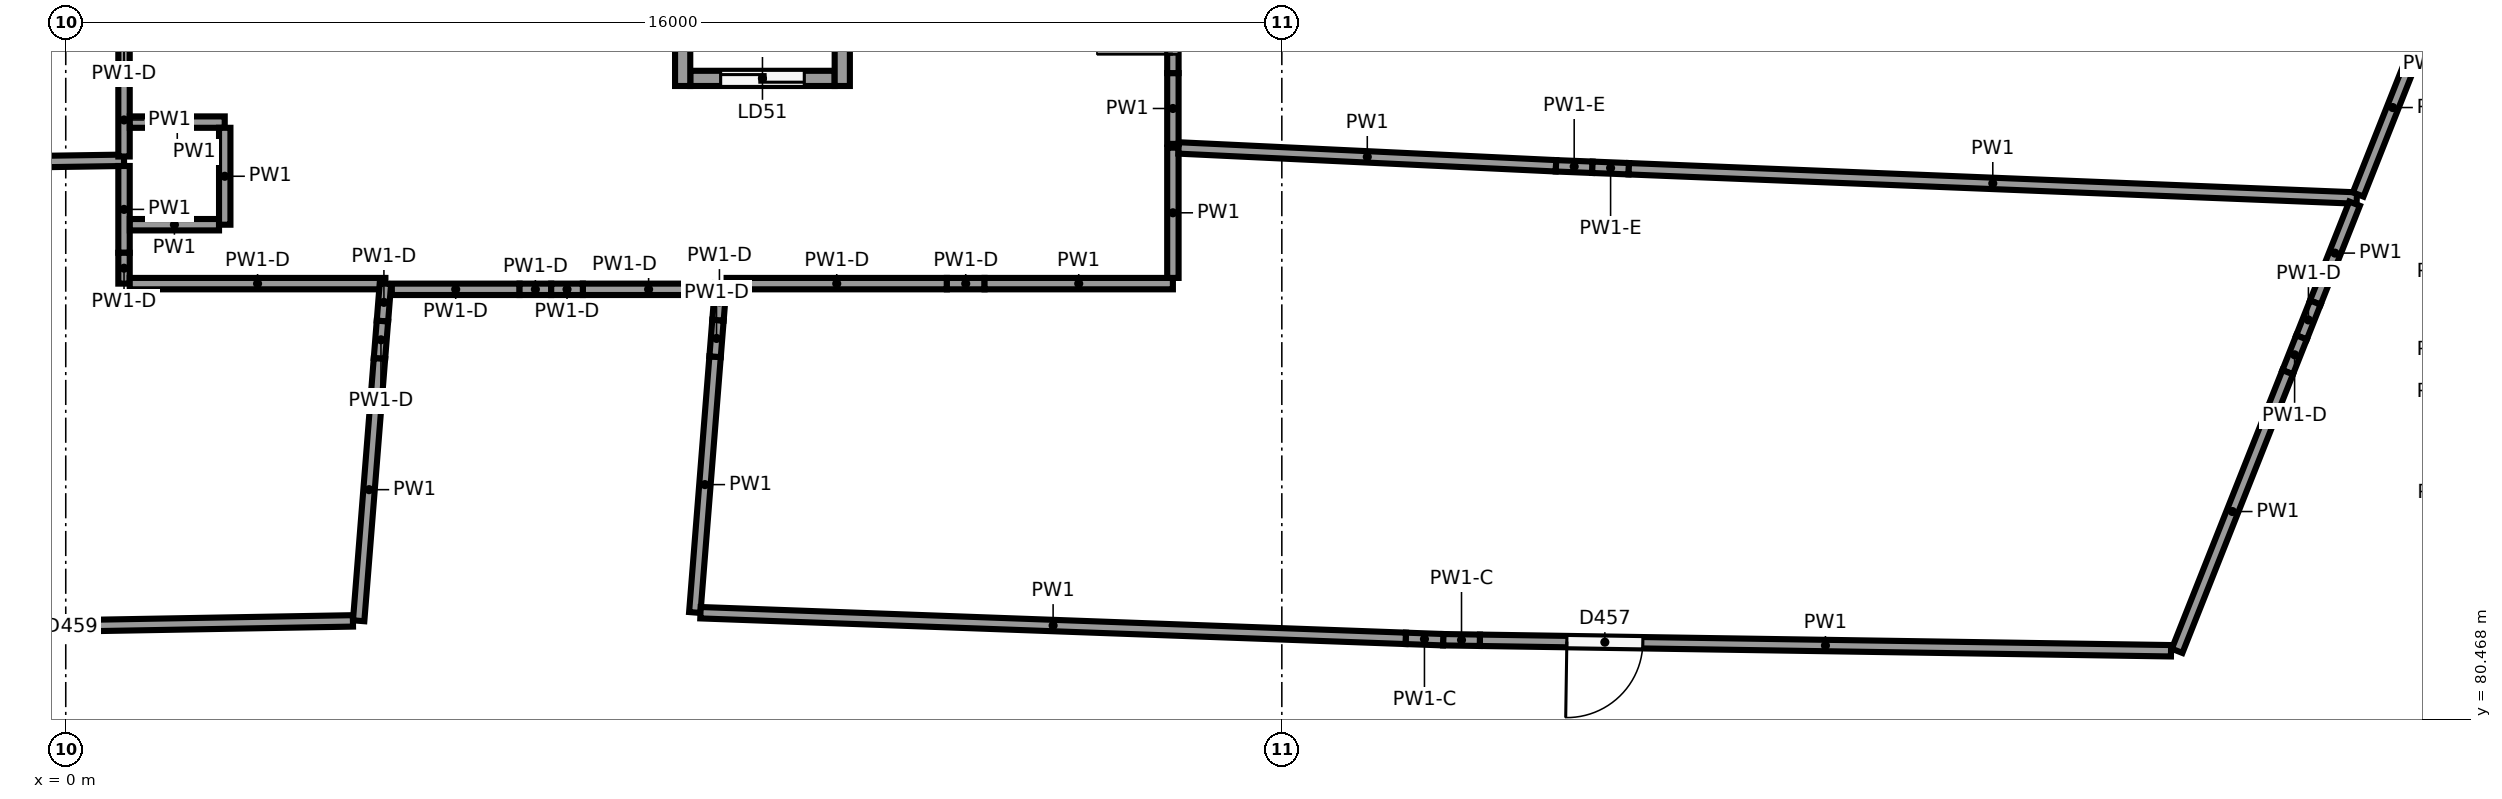
"""IFC4 building model, lengths in metres.
Left out: names, types, materials, properties, quantities, classifications, styles, units other than length and angle.
Written with IfcOpenShell. Run it as: python <this file> out.ifc"""

import sys

from ifc_helpers import new_model, si_unit, direction, frame, frame_2d, origin, origin_2d, place, context, subcontext, project, spatial, rectangle, circle, extrude, element, fill, save


model = new_model("IFC4")
c1 = context("Model", 3, precision=1e-05, world=origin(), true_north=direction((0.0, 1.0)))
c2 = subcontext(c1, "Body", "Model", "MODEL_VIEW")
j1 = project(units=[si_unit("LENGTHUNIT", "METRE"), si_unit("PLANEANGLEUNIT", "RADIAN")], contexts=[c1])
p1 = place(None, origin())
s1 = spatial("IfcSite", under=j1, at=p1, CompositionType="ELEMENT")
p2 = place(p1, origin())
s2 = spatial("IfcBuilding", under=s1, at=p2, CompositionType="ELEMENT")
p3 = place(p2, frame((0.0, 0.0, -4.0)))
s3 = spatial("IfcBuildingStorey", under=s2, at=p3, CompositionType="ELEMENT", Elevation=-4.0)
p4 = place(p3, frame((19.119, 85.698, -0.4), z_axis=(0.0, 0.0, 1.0), x_axis=(1.0, 0.0, 0.0)))
e1 = element("IfcColumn", 1, at=p4, inside=s3, PredefinedType="COLUMN", context=c2, shape_type="SweptSolid", body=[
    extrude(circle(Radius=0.4, at=origin_2d()), origin(), (0.0, 0.0, 1.0), 4.4),
])
p5 = place(p3, frame((20.65, 89.656, -0.4), z_axis=(0.0, 0.0, 1.0), x_axis=(1.0, 0.0, 0.0)))
e2 = element("IfcColumn", 2, at=p5, inside=s3, PredefinedType="COLUMN", context=c2, shape_type="SweptSolid", body=[
    extrude(circle(Radius=0.45, at=origin_2d()), origin(), (0.0, 0.0, 1.0), 4.4),
])
p6 = place(p3, frame((6.387, 85.877, -1.2), z_axis=(0.0, 0.0, 1.0), x_axis=(1.0, 0.0, 0.0)))
e3 = element("IfcColumn", 3, at=p6, inside=s3, PredefinedType="COLUMN", context=c2, shape_type="SweptSolid", body=[
    extrude(circle(Radius=0.4, at=origin_2d()), origin(), (0.0, 0.0, 1.0), 5.2),
])
p7 = place(p3, frame((6.517, 89.546, -1.2), z_axis=(0.0, 0.0, 1.0), x_axis=(1.0, 0.0, 0.0)))
e4 = element("IfcColumn", 4, at=p7, inside=s3, PredefinedType="COLUMN", context=c2, shape_type="SweptSolid", body=[
    extrude(circle(Radius=0.55, at=origin_2d()), origin(), (0.0, 0.0, 1.0), 5.2),
])
for number, where, z_axis, x_axis in (
    (5, (10.217, 91.8, -1.2), (0.0, 0.0, 1.0), (0.0, -1.0, 0.0)),
    (6, (8.117, 91.8, -1.2), (0.0, 0.0, 1.0), (0.0, -1.0, 0.0)),
):
    element("IfcWall", number, at=place(p3, frame(where, z_axis=z_axis, x_axis=x_axis)), inside=s3, PredefinedType="SHEAR", context=c2, shape_type="SweptSolid", body=[
        extrude(rectangle(XDim=3.0, YDim=0.2, at=frame_2d((1.5, 0.0))), origin(), (0.0, 0.0, 1.0), 4.8),
    ])
p8 = place(p3, frame((10.117, 88.9, -1.2), z_axis=(0.0, 0.0, 1.0), x_axis=(-1.0, 0.0, 0.0)))
e7 = element("IfcWall", 7, at=p8, inside=s3, PredefinedType="SHEAR", context=c2, shape_type="SweptSolid", body=[
    extrude(rectangle(XDim=1.9, YDim=0.2, at=frame_2d((0.95, 0.0))), origin(), (0.0, 0.0, 1.0), 4.8),
])
p9 = place(p8, frame((0.4, 0.0, 1.2)))
e8 = element("IfcOpeningElement", 8, at=p9, cuts=e7, PredefinedType="OPENING", context=c2, shape_type="SweptSolid", body=[
    extrude(rectangle(XDim=1.1, YDim=2.1, at=frame_2d((0.55, 1.05))), frame((0.0, 0.11, 0.0), z_axis=(0.0, -1.0, 0.0), x_axis=(1.0, 0.0, 0.0)), (0.0, 0.0, 1.0), 0.22),
])
p10 = place(p3, frame((8.276, 81.873, 0.0), z_axis=(0.0, 0.0, 1.0), x_axis=(0.079118582515, 0.996865211501, 0.0)))
e9 = element("IfcWall", 9, at=p10, inside=s3, PredefinedType="PARTITIONING", context=c2, shape_type="SweptSolid", body=[
    extrude(rectangle(XDim=3.376, YDim=0.15, at=frame_2d((1.688, 0.0))), origin(), (0.0, 0.0, 1.0), 3.6),
])
for number, where, z_axis, x_axis in (
    (10, (8.543, 85.239, 0.0), (0.0, 0.0, 1.0), (0.079, 0.997, 0.0)),
    (11, (8.582, 85.719, 0.0), (0.0, 0.0, 1.0), (0.079, 0.997, 0.0)),
):
    element("IfcWall", number, at=place(p3, frame(where, z_axis=z_axis, x_axis=x_axis)), inside=s3, PredefinedType="PARTITIONING", context=c2, shape_type="SweptSolid", body=[
        extrude(rectangle(XDim=0.482, YDim=0.15, at=frame_2d((0.241, 0.0))), origin(), (0.0, 0.0, 1.0), 2.3),
    ])
p11 = place(p3, frame((8.695, 86.2, 0.0), z_axis=(0.0, 0.0, 1.0), x_axis=(1.0, 0.0, 0.0)))
e12 = element("IfcWall", 12, at=p11, inside=s3, PredefinedType="PARTITIONING", context=c2, shape_type="SweptSolid", body=[
    extrude(rectangle(XDim=2.898, YDim=0.15, at=frame_2d((1.449, 0.0))), origin(), (0.0, 0.0, 1.0), 2.3),
])
p12 = place(p3, frame((11.593, 86.2, 0.0), z_axis=(0.0, 0.0, 1.0), x_axis=(1.0, 0.0, 0.0)))
e13 = element("IfcWall", 13, at=p12, inside=s3, PredefinedType="PARTITIONING", context=c2, shape_type="SweptSolid", body=[
    extrude(rectangle(XDim=0.496, YDim=0.15, at=frame_2d((0.248, 0.0))), origin(), (0.0, 0.0, 1.0), 2.3),
])
p13 = place(p3, frame((12.089, 86.2, 0.0), z_axis=(0.0, 0.0, 1.0), x_axis=(1.0, 0.0, 0.0)))
e14 = element("IfcWall", 14, at=p13, inside=s3, PredefinedType="PARTITIONING", context=c2, shape_type="SweptSolid", body=[
    extrude(rectangle(XDim=2.478, YDim=0.15, at=frame_2d((1.239, 0.0))), origin(), (0.0, 0.0, 1.0), 3.6),
])
p14 = place(p3, frame((14.567, 86.275, 0.0), z_axis=(0.0, 0.0, 1.0), x_axis=(0.0, 1.0, 0.0)))
e15 = element("IfcWall", 15, at=p14, inside=s3, PredefinedType="PARTITIONING", context=c2, shape_type="SweptSolid", body=[
    extrude(rectangle(XDim=1.714, YDim=0.15, at=frame_2d((0.857, 0.0))), origin(), (0.0, 0.0, 1.0), 3.6),
])
p15 = place(p3, frame((14.642, 87.985, 0.0), z_axis=(0.0, 0.0, 1.0), x_axis=(0.998880990071, -0.047294478265, 0.0)))
e16 = element("IfcWall", 16, at=p15, inside=s3, PredefinedType="PARTITIONING", context=c2, shape_type="SweptSolid", body=[
    extrude(rectangle(XDim=4.971, YDim=0.15, at=frame_2d((2.486, 0.0))), origin(), (0.0, 0.0, 1.0), 3.6),
])
p16 = place(p3, frame((19.607, 87.75, 0.0), z_axis=(0.0, 0.0, 1.0), x_axis=(0.999190347819, -0.040232435004, 0.0)))
e17 = element("IfcWall", 17, at=p16, inside=s3, PredefinedType="PARTITIONING", context=c2, shape_type="SweptSolid", body=[
    extrude(rectangle(XDim=0.479, YDim=0.15, at=frame_2d((0.24, 0.0))), origin(), (0.0, 0.0, 1.0), 2.85),
])
p17 = place(p3, frame((20.086, 87.731, 0.0), z_axis=(0.0, 0.0, 1.0), x_axis=(0.999189522857, -0.040252918055, 0.0)))
e18 = element("IfcWall", 18, at=p17, inside=s3, PredefinedType="PARTITIONING", context=c2, shape_type="SweptSolid", body=[
    extrude(rectangle(XDim=0.479, YDim=0.15, at=frame_2d((0.24, 0.0))), origin(), (0.0, 0.0, 1.0), 2.85),
])
p18 = place(p3, frame((20.565, 87.711, 0.0), z_axis=(0.0, 0.0, 1.0), x_axis=(0.999191082899, -0.040214174799, 0.0)))
e19 = element("IfcWall", 19, at=p18, inside=s3, PredefinedType="PARTITIONING", context=c2, shape_type="SweptSolid", body=[
    extrude(rectangle(XDim=9.586, YDim=0.15, at=frame_2d((4.793, 0.0))), origin(), (0.0, 0.0, 1.0), 3.6),
])
p19 = place(p3, frame((30.114, 87.252, 0.0), z_axis=(0.0, 0.0, 1.0), x_axis=(-0.368802456255, -0.929507798924, 0.0)))
e20 = element("IfcWall", 20, at=p19, inside=s3, PredefinedType="PARTITIONING", context=c2, shape_type="SweptSolid", body=[
    extrude(rectangle(XDim=1.399, YDim=0.15, at=frame_2d((0.7, 0.0))), origin(), (0.0, 0.0, 1.0), 3.6),
])
for number, where, z_axis, x_axis in (
    (21, (29.598, 85.951, 0.0), (0.0, 0.0, 1.0), (-0.369, -0.929, 0.0)),
    (22, (29.416, 85.493, 0.0), (0.0, 0.0, 1.0), (-0.369, -0.929, 0.0)),
):
    element("IfcWall", number, at=place(p3, frame(where, z_axis=z_axis, x_axis=x_axis)), inside=s3, PredefinedType="PARTITIONING", context=c2, shape_type="SweptSolid", body=[
        extrude(rectangle(XDim=0.493, YDim=0.15, at=frame_2d((0.247, 0.0))), origin(), (0.0, 0.0, 1.0), 2.3),
    ])
p20 = place(p3, frame((29.234, 85.035, 0.0), z_axis=(0.0, 0.0, 1.0), x_axis=(-0.368859950934, -0.9294849846, 0.0)))
e23 = element("IfcWall", 23, at=p20, inside=s3, PredefinedType="PARTITIONING", context=c2, shape_type="SweptSolid", body=[
    extrude(rectangle(XDim=3.944, YDim=0.15, at=frame_2d((1.972, 0.0))), origin(), (0.0, 0.0, 1.0), 3.6),
])
p21 = place(p3, frame((27.699, 81.37, 0.0), z_axis=(0.0, 0.0, 1.0), x_axis=(-0.999884976641, 0.015166854913, 0.0)))
e24 = element("IfcWall", 24, at=p21, inside=s3, PredefinedType="PARTITIONING", context=c2, shape_type="SweptSolid", body=[
    extrude(rectangle(XDim=9.095, YDim=0.15, at=frame_2d((4.547, 0.0))), origin(), (0.0, 0.0, 1.0), 3.6),
])
p22 = place(p21, frame((6.95, 0.0, 0.0)))
e25 = element("IfcOpeningElement", 25, at=p22, cuts=e24, PredefinedType="OPENING", context=c2, shape_type="SweptSolid", body=[
    extrude(rectangle(XDim=1.0, YDim=2.1, at=frame_2d((0.5, 1.05))), frame((0.0, 0.085, 0.0), z_axis=(0.0, -1.0, 0.0), x_axis=(1.0, 0.0, 0.0)), (0.0, 0.0, 1.0), 0.17),
])
p23 = place(p3, frame((18.605, 81.508, 0.0), z_axis=(0.0, 0.0, 1.0), x_axis=(-0.999884887051, 0.015172760046, 0.0)))
e26 = element("IfcWall", 26, at=p23, inside=s3, PredefinedType="PARTITIONING", context=c2, shape_type="SweptSolid", body=[
    extrude(rectangle(XDim=0.483, YDim=0.15, at=frame_2d((0.241, 0.0))), origin(), (0.0, 0.0, 1.0), 2.7),
])
p24 = place(p3, frame((18.123, 81.515, 0.0), z_axis=(0.0, 0.0, 1.0), x_axis=(-0.999327668451, 0.036663484118, 0.0)))
e27 = element("IfcWall", 27, at=p24, inside=s3, PredefinedType="PARTITIONING", context=c2, shape_type="SweptSolid", body=[
    extrude(rectangle(XDim=0.493, YDim=0.15, at=frame_2d((0.246, 0.0))), origin(), (0.0, 0.0, 1.0), 2.7),
])
p25 = place(p3, frame((17.63, 81.533, 0.0), z_axis=(0.0, 0.0, 1.0), x_axis=(-0.999339567389, 0.036337708373, 0.0)))
e28 = element("IfcWall", 28, at=p25, inside=s3, PredefinedType="PARTITIONING", context=c2, shape_type="SweptSolid", body=[
    extrude(rectangle(XDim=9.285, YDim=0.15, at=frame_2d((4.643, 0.0))), origin(), (0.0, 0.0, 1.0), 3.6),
])
p26 = place(p3, frame((14.567, 88.039, 0.0), z_axis=(0.0, 0.0, 1.0), x_axis=(0.0, 1.0, 0.0)))
e29 = element("IfcWall", 29, at=p26, inside=s3, PredefinedType="PARTITIONING", context=c2, shape_type="SweptSolid", body=[
    extrude(rectangle(XDim=0.931, YDim=0.15, at=frame_2d((0.466, 0.0))), origin(), (0.0, 0.0, 1.0), 3.6),
])
p27 = place(p3, frame((14.567, 88.97, 0.0), z_axis=(0.0, 0.0, 1.0), x_axis=(0.0, 1.0, 0.0)))
e30 = element("IfcWall", 30, at=p27, inside=s3, PredefinedType="PARTITIONING", context=c2, shape_type="SweptSolid", body=[
    extrude(rectangle(XDim=1.397, YDim=0.15, at=frame_2d((0.698, 0.0))), origin(), (0.0, 0.0, 1.0), 2.3),
])
p28 = place(p27, frame((0.25, 0.0, 0.0)))
e31 = element("IfcOpeningElement", 31, at=p28, cuts=e30, PredefinedType="OPENING", context=c2, shape_type="SweptSolid", body=[
    extrude(rectangle(XDim=1.0, YDim=2.1, at=frame_2d((0.5, 1.05))), frame((0.0, 0.085, 0.0), z_axis=(0.0, -1.0, 0.0), x_axis=(1.0, 0.0, 0.0)), (0.0, 0.0, 1.0), 0.17),
])
p29 = place(p3, frame((31.07, 89.661, 0.0), z_axis=(0.0, 0.0, 1.0), x_axis=(-0.368825125467, -0.9294988041, 0.0)))
e32 = element("IfcWall", 32, at=p29, inside=s3, PredefinedType="PARTITIONING", context=c2, shape_type="SweptSolid", body=[
    extrude(rectangle(XDim=2.462, YDim=0.15, at=frame_2d((1.231, 0.0))), origin(), (0.0, 0.0, 1.0), 3.6),
])
p30 = place(p3, frame((-6.178, 87.716, 0.0), z_axis=(0.0, 0.0, 1.0), x_axis=(0.999883104063, 0.01528980737, 0.0)))
e33 = element("IfcWall", 33, at=p30, inside=s3, PredefinedType="PARTITIONING", context=c2, shape_type="SweptSolid", body=[
    extrude(rectangle(XDim=6.946, YDim=0.15, at=frame_2d((3.473, 0.0))), origin(), (0.0, 0.0, 1.0), 3.6),
])
p31 = place(p3, frame((0.767, 87.748, 0.0), z_axis=(0.0, 0.0, 1.0), x_axis=(0.0, -1.0, 0.0)))
e34 = element("IfcWall", 34, at=p31, inside=s3, PredefinedType="PARTITIONING", context=c2, shape_type="SweptSolid", body=[
    extrude(rectangle(XDim=1.142, YDim=0.15, at=frame_2d((0.571, 0.0))), origin(), (0.0, 0.0, 1.0), 3.6),
])
p32 = place(p3, frame((0.767, 86.606, 0.0), z_axis=(0.0, 0.0, 1.0), x_axis=(0.0, -1.0, 0.0)))
e35 = element("IfcWall", 35, at=p32, inside=s3, PredefinedType="PARTITIONING", context=c2, shape_type="SweptSolid", body=[
    extrude(rectangle(XDim=0.406, YDim=0.15, at=frame_2d((0.203, 0.0))), origin(), (0.0, 0.0, 1.0), 2.3),
])
p33 = place(p3, frame((0.842, 86.2, 0.0), z_axis=(0.0, 0.0, 1.0), x_axis=(1.0, 0.0, 0.0)))
e36 = element("IfcWall", 36, at=p33, inside=s3, PredefinedType="PARTITIONING", context=c2, shape_type="SweptSolid", body=[
    extrude(rectangle(XDim=3.364, YDim=0.15, at=frame_2d((1.682, 0.0))), origin(), (0.0, 0.0, 1.0), 2.3),
])
p34 = place(p3, frame((4.206, 86.2, 0.0), z_axis=(0.0, 0.0, 1.0), x_axis=(-0.078999477554, -0.99687465739, 0.0)))
e37 = element("IfcWall", 37, at=p34, inside=s3, PredefinedType="PARTITIONING", context=c2, shape_type="SweptSolid", body=[
    extrude(rectangle(XDim=0.494, YDim=0.15, at=frame_2d((0.247, 0.0))), origin(), (0.0, 0.0, 1.0), 2.3),
])
p35 = place(p3, frame((4.167, 85.707, 0.0), z_axis=(0.0, 0.0, 1.0), x_axis=(-0.079529255553, -0.99683253233, 0.0)))
e38 = element("IfcWall", 38, at=p35, inside=s3, PredefinedType="PARTITIONING", context=c2, shape_type="SweptSolid", body=[
    extrude(rectangle(XDim=0.494, YDim=0.15, at=frame_2d((0.247, 0.0))), origin(), (0.0, 0.0, 1.0), 2.3),
])
p36 = place(p3, frame((4.127, 85.214, 0.0), z_axis=(0.0, 0.0, 1.0), x_axis=(-0.079080692969, -0.99686821797, 0.0)))
e39 = element("IfcWall", 39, at=p36, inside=s3, PredefinedType="PARTITIONING", context=c2, shape_type="SweptSolid", body=[
    extrude(rectangle(XDim=3.461, YDim=0.15, at=frame_2d((1.73, 0.0))), origin(), (0.0, 0.0, 1.0), 3.6),
])
p37 = place(p3, frame((3.778, 81.763, 0.0), z_axis=(0.0, 0.0, 1.0), x_axis=(-0.999845432781, -0.017581539953, 0.0)))
e40 = element("IfcWall", 40, at=p37, inside=s3, PredefinedType="PARTITIONING", context=c2, shape_type="SweptSolid", body=[
    extrude(rectangle(XDim=9.332, YDim=0.15, at=frame_2d((4.666, 0.0))), origin(), (0.0, 0.0, 1.0), 3.6),
])
p38 = place(p37, frame((4.2, 0.0, 0.0)))
e41 = element("IfcOpeningElement", 41, at=p38, cuts=e40, PredefinedType="OPENING", context=c2, shape_type="SweptSolid", body=[
    extrude(rectangle(XDim=1.0, YDim=2.1, at=frame_2d((0.5, 1.05))), frame((0.0, 0.085, 0.0), z_axis=(0.0, -1.0, 0.0), x_axis=(1.0, 0.0, 0.0)), (0.0, 0.0, 1.0), 0.17),
])
p39 = place(p3, frame((0.767, 89.315, 0.0), z_axis=(0.0, 0.0, 1.0), x_axis=(0.0, -1.0, 0.0)))
e42 = element("IfcWall", 42, at=p39, inside=s3, PredefinedType="PARTITIONING", context=c2, shape_type="SweptSolid", body=[
    extrude(rectangle(XDim=0.481, YDim=0.15, at=frame_2d((0.24, 0.0))), origin(), (0.0, 0.0, 1.0), 2.3),
])
p40 = place(p3, frame((0.767, 88.834, 0.0), z_axis=(0.0, 0.0, 1.0), x_axis=(0.0, -1.0, 0.0)))
e43 = element("IfcWall", 43, at=p40, inside=s3, PredefinedType="PARTITIONING", context=c2, shape_type="SweptSolid", body=[
    extrude(rectangle(XDim=0.961, YDim=0.15, at=frame_2d((0.481, 0.0))), origin(), (0.0, 0.0, 1.0), 3.6),
])
p41 = place(p3, frame((2.092, 88.325, 0.0), z_axis=(0.0, 0.0, 1.0), x_axis=(-1.0, 0.0, 0.0)))
e44 = element("IfcWall", 44, at=p41, inside=s3, PredefinedType="PARTITIONING", context=c2, shape_type="SweptSolid", body=[
    extrude(rectangle(XDim=1.249, YDim=0.15, at=frame_2d((0.625, 0.0))), origin(), (0.0, 0.0, 1.0), 3.6),
])
p42 = place(p3, frame((0.843, 86.975, 0.0), z_axis=(0.0, 0.0, 1.0), x_axis=(1.0, 0.0, 0.0)))
e45 = element("IfcWall", 45, at=p42, inside=s3, PredefinedType="PARTITIONING", context=c2, shape_type="SweptSolid", body=[
    extrude(rectangle(XDim=1.174, YDim=0.15, at=frame_2d((0.587, 0.0))), origin(), (0.0, 0.0, 1.0), 3.6),
])
p43 = place(p3, frame((2.092, 86.975, 0.0), z_axis=(0.0, 0.0, 1.0), x_axis=(0.0, 1.0, 0.0)))
e46 = element("IfcWall", 46, at=p43, inside=s3, PredefinedType="PARTITIONING", context=c2, shape_type="SweptSolid", body=[
    extrude(rectangle(XDim=1.275, YDim=0.15, at=frame_2d((0.637, 0.0))), origin(), (0.0, 0.0, 1.0), 3.6),
])
p44 = place(p3, frame((4.29, 86.125, 0.0), z_axis=(0.0, 0.0, 1.0), x_axis=(1.0, 0.0, 0.0)))
e47 = element("IfcWall", 47, at=p44, inside=s3, PredefinedType="PARTITIONING", context=c2, shape_type="SweptSolid", body=[
    extrude(rectangle(XDim=1.68, YDim=0.15, at=frame_2d((0.84, 0.0))), origin(), (0.0, 0.0, 1.0), 2.3),
])
p45 = place(p3, frame((6.803, 86.125, 0.0), z_axis=(0.0, 0.0, 1.0), x_axis=(1.0, 0.0, 0.0)))
e48 = element("IfcWall", 48, at=p45, inside=s3, PredefinedType="PARTITIONING", context=c2, shape_type="SweptSolid", body=[
    extrude(rectangle(XDim=1.731, YDim=0.15, at=frame_2d((0.865, 0.0))), origin(), (0.0, 0.0, 1.0), 2.3),
])
p46 = place(p3, frame((5.971, 86.125, 0.0), z_axis=(0.0, 0.0, 1.0), x_axis=(1.0, 0.0, 0.0)))
e49 = element("IfcWall", 49, at=p46, inside=s3, PredefinedType="PARTITIONING", context=c2, shape_type="SweptSolid", body=[
    extrude(rectangle(XDim=0.417, YDim=0.15, at=frame_2d((0.208, 0.0))), origin(), (0.0, 0.0, 1.0), 2.3),
])
p47 = place(p3, frame((6.387, 86.125, 0.0), z_axis=(0.0, 0.0, 1.0), x_axis=(1.0, 0.0, 0.0)))
e50 = element("IfcWall", 50, at=p47, inside=s3, PredefinedType="PARTITIONING", context=c2, shape_type="SweptSolid", body=[
    extrude(rectangle(XDim=0.416, YDim=0.15, at=frame_2d((0.208, 0.0))), origin(), (0.0, 0.0, 1.0), 2.3),
])
p48 = place(p9, origin())
e51 = element("IfcDoor", 51, at=p48, inside=s3, OperationType="SLIDING_TO_LEFT", PredefinedType="DOOR", context=c2, shape_type="SweptSolid", body=[
    extrude(rectangle(XDim=1.1, YDim=2.1, at=frame_2d((0.55, 1.05))), frame((0.0, 0.025, 0.0), z_axis=(0.0, -1.0, 0.0), x_axis=(1.0, 0.0, 0.0)), (0.0, 0.0, 1.0), 0.05),
])
fill(e8, e51)
p49 = place(p22, origin())
e52 = element("IfcDoor", 52, at=p49, inside=s3, OperationType="SINGLE_SWING_RIGHT", PredefinedType="DOOR", context=c2, shape_type="SweptSolid", body=[
    extrude(rectangle(XDim=1.0, YDim=2.1, at=frame_2d((0.5, 1.05))), frame((0.0, 0.025, 0.0), z_axis=(0.0, -1.0, 0.0), x_axis=(1.0, 0.0, 0.0)), (0.0, 0.0, 1.0), 0.05),
])
fill(e25, e52)
p50 = place(p28, origin())
e53 = element("IfcDoor", 53, at=p50, inside=s3, OperationType="SINGLE_SWING_LEFT", PredefinedType="DOOR", context=c2, shape_type="SweptSolid", body=[
    extrude(rectangle(XDim=1.0, YDim=2.1, at=frame_2d((0.5, 1.05))), frame((0.0, 0.025, 0.0), z_axis=(0.0, -1.0, 0.0), x_axis=(1.0, 0.0, 0.0)), (0.0, 0.0, 1.0), 0.05),
])
fill(e31, e53)
save(model, sys.argv[1])
